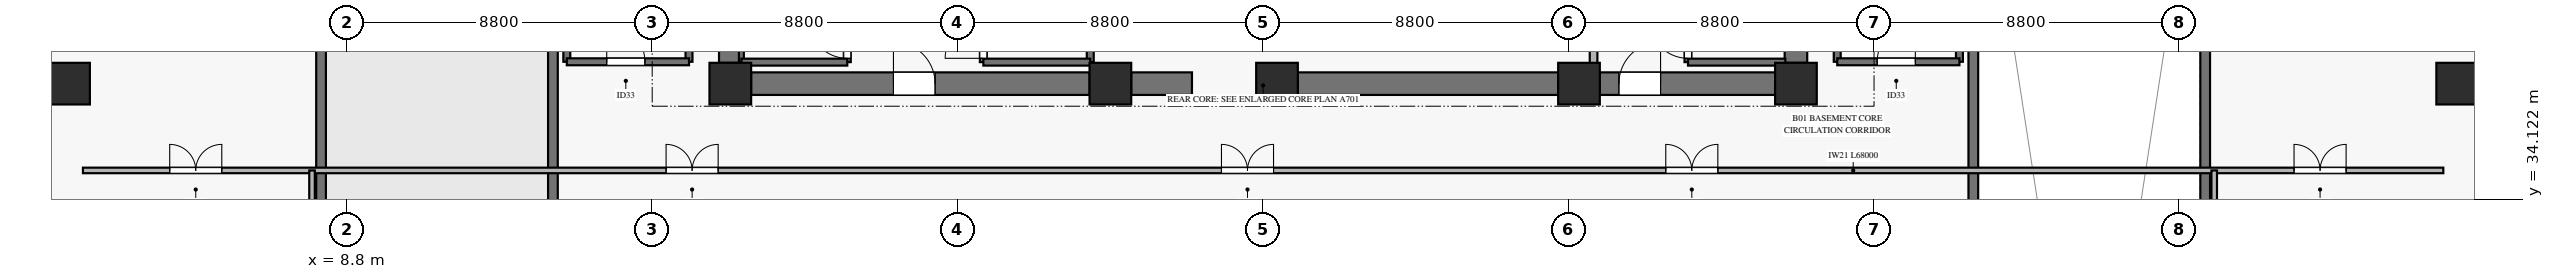
"""IFC4 building model, lengths in metres.
Left out: names, types, materials, properties, quantities, classifications, styles, units other than length and angle.
Written with IfcOpenShell. Run it as: python <this file> out.ifc"""

import sys

from ifc_helpers import new_model, si_unit, direction, frame, frame_2d, origin, origin_2d, place, context, subcontext, project, spatial, rectangle, hollow_rectangle, extrude, source, transform, mapped, element, fill, save


model = new_model("IFC4")
c1 = context("Model", 3, precision=1e-05, world=origin(), true_north=direction((0.0, 1.0)))
c2 = subcontext(c1, "Body", "Model", "MODEL_VIEW")
j1 = project(units=[si_unit("LENGTHUNIT", "METRE"), si_unit("PLANEANGLEUNIT", "RADIAN")], contexts=[c1])
p1 = place(None, origin())
s1 = spatial("IfcSite", under=j1, at=p1, CompositionType="ELEMENT")
p2 = place(p1, origin())
s2 = spatial("IfcBuilding", under=s1, at=p2, CompositionType="ELEMENT")
p3 = place(p2, frame((0.0, 0.0, -5.2)))
s3 = spatial("IfcBuildingStorey", under=s2, at=p3, CompositionType="ELEMENT", Elevation=-5.2)
m1 = source(origin(), c2, "Body", "SweptSolid", [
    extrude(rectangle(XDim=1.2, YDim=1.2, at=origin_2d()), origin(), (0.0, 0.0, 1.0), 4.94),
])
for number, where, z_axis, x_axis in (
    (1, (19.85, 37.45, 0.0), (0.0, 0.0, 1.0), (1.0, 0.0, 0.0)),
    (2, (30.8, 37.45, 0.0), (0.0, 0.0, 1.0), (1.0, 0.0, 0.0)),
    (3, (35.6, 37.45, 0.0), (0.0, 0.0, 1.0), (1.0, 0.0, 0.0)),
    (4, (44.3, 37.45, 0.0), (0.0, 0.0, 1.0), (1.0, 0.0, 0.0)),
    (5, (50.55, 37.45, 0.0), (0.0, 0.0, 1.0), (1.0, 0.0, 0.0)),
):
    element("IfcColumn", number, at=place(p3, frame(where, z_axis=z_axis, x_axis=x_axis)), inside=s3, PredefinedType="PILASTER", context=c2, shape_type="MappedRepresentation", body=[
        mapped(m1, transform((0.0, 0.0, 0.0), x_axis=(1.0, 0.0, 0.0), y_axis=(0.0, 1.0, 0.0), z_axis=(0.0, 0.0, 1.0), scale=1.0)),
    ])
p4 = place(p3, frame((20.45, 37.45, 0.0), z_axis=(0.0, 0.0, 1.0), x_axis=(1.0, 0.0, 0.0)))
e6 = element("IfcWall", 6, at=p4, inside=s3, PredefinedType="SHEAR", context=c2, shape_type="SweptSolid", body=[
    extrude(rectangle(XDim=9.75, YDim=0.65, at=frame_2d((4.875, 0.0))), origin(), (0.0, 0.0, 1.0), 4.94),
])
p5 = place(p4, frame((4.1, 0.0, 0.0)))
e7 = element("IfcOpeningElement", 7, at=p5, cuts=e6, PredefinedType="OPENING", context=c2, shape_type="SweptSolid", body=[
    extrude(rectangle(XDim=1.2, YDim=2.15, at=frame_2d((0.6, 1.075))), frame((0.0, 0.335, 0.0), z_axis=(0.0, -1.0, 0.0), x_axis=(1.0, 0.0, 0.0)), (0.0, 0.0, 1.0), 0.67),
])
p6 = place(p3, frame((31.4, 37.45, 0.0), z_axis=(0.0, 0.0, 1.0), x_axis=(1.0, 0.0, 0.0)))
e8 = element("IfcWall", 8, at=p6, inside=s3, PredefinedType="SHEAR", context=c2, shape_type="SweptSolid", body=[
    extrude(rectangle(XDim=1.75, YDim=0.65, at=frame_2d((0.875, 0.0))), origin(), (0.0, 0.0, 1.0), 4.94),
])
p7 = place(p3, frame((36.2, 37.45, 0.0), z_axis=(0.0, 0.0, 1.0), x_axis=(1.0, 0.0, 0.0)))
e9 = element("IfcWall", 9, at=p7, inside=s3, PredefinedType="SHEAR", context=c2, shape_type="SweptSolid", body=[
    extrude(rectangle(XDim=7.5, YDim=0.65, at=frame_2d((3.75, 0.0))), origin(), (0.0, 0.0, 1.0), 4.94),
])
p8 = place(p3, frame((44.9, 37.45, 0.0), z_axis=(0.0, 0.0, 1.0), x_axis=(1.0, 0.0, 0.0)))
e10 = element("IfcWall", 10, at=p8, inside=s3, PredefinedType="SHEAR", context=c2, shape_type="SweptSolid", body=[
    extrude(rectangle(XDim=5.05, YDim=0.65, at=frame_2d((2.525, 0.0))), origin(), (0.0, 0.0, 1.0), 4.94),
])
p9 = place(p8, frame((0.55, 0.0, 0.0)))
e11 = element("IfcOpeningElement", 11, at=p9, cuts=e10, PredefinedType="OPENING", context=c2, shape_type="SweptSolid", body=[
    extrude(rectangle(XDim=1.2, YDim=2.15, at=frame_2d((0.6, 1.075))), frame((0.0, 0.335, 0.0), z_axis=(0.0, -1.0, 0.0), x_axis=(1.0, 0.0, 0.0)), (0.0, 0.0, 1.0), 0.67),
])
for number, where, z_axis, x_axis in (
    (12, (19.85, 38.05, 0.0), (0.0, 0.0, 1.0), (0.0, 1.0, 0.0)),
    (13, (50.55, 38.05, 0.0), (0.0, 0.0, 1.0), (0.0, 1.0, 0.0)),
):
    element("IfcWall", number, at=place(p3, frame(where, z_axis=z_axis, x_axis=x_axis)), inside=s3, PredefinedType="SHEAR", context=c2, shape_type="SweptSolid", body=[
        extrude(rectangle(XDim=7.9, YDim=0.65, at=frame_2d((3.95, 0.0))), origin(), (0.0, 0.0, 1.0), 4.94),
    ])
m2 = source(origin(), c2, "Body", "SweptSolid", [
    extrude(hollow_rectangle(XDim=1.2, YDim=1.2, WallThickness=0.055, at=origin_2d()), origin(), (0.0, 0.0, 1.0), 4.94),
])
for number, where, z_axis, x_axis in (
    (14, (0.8, 37.45, 0.0), (0.0, 0.0, 1.0), (1.0, 0.0, 0.0)),
    (15, (69.6, 37.45, 0.0), (0.0, 0.0, 1.0), (1.0, 0.0, 0.0)),
):
    element("IfcColumn", number, at=place(p3, frame(where, z_axis=z_axis, x_axis=x_axis)), inside=s3, PredefinedType="COLUMN", context=c2, shape_type="MappedRepresentation", body=[
        mapped(m2, transform((0.0, 0.0, 0.0), x_axis=(1.0, 0.0, 0.0), y_axis=(0.0, 1.0, 0.0), z_axis=(0.0, 0.0, 1.0), scale=1.0)),
    ])
for number, where, z_axis, x_axis in (
    (16, (55.66, 3.46, 0.0), (0.0, 0.0, 1.0), (0.0, 1.0, 0.0)),
    (17, (62.34, 3.46, 0.0), (0.0, 0.0, 1.0), (0.0, 1.0, 0.0)),
):
    element("IfcWall", number, at=place(p3, frame(where, z_axis=z_axis, x_axis=x_axis)), inside=s3, PredefinedType="SOLIDWALL", context=c2, shape_type="SweptSolid", body=[
        extrude(rectangle(XDim=41.74, YDim=0.28, at=frame_2d((20.87, 0.0))), origin(), (0.0, 0.0, 1.0), 4.94),
    ])
for number, where, z_axis, x_axis in (
    (18, (8.06, 6.76, 0.0), (0.0, 0.0, 1.0), (0.0, 1.0, 0.0)),
    (19, (14.74, 6.76, 0.0), (0.0, 0.0, 1.0), (0.0, 1.0, 0.0)),
):
    element("IfcWall", number, at=place(p3, frame(where, z_axis=z_axis, x_axis=x_axis)), inside=s3, PredefinedType="SOLIDWALL", context=c2, shape_type="SweptSolid", body=[
        extrude(rectangle(XDim=42.0, YDim=0.28, at=frame_2d((21.0, 0.0))), origin(), (0.0, 0.0, 1.0), 5.2),
    ])
p10 = place(p3, frame((20.17, 38.07, 0.0), z_axis=(0.0, 0.0, 1.0), x_axis=(0.0, 1.0, 0.0)))
e20 = element("IfcWall", 20, at=p10, inside=s3, PredefinedType="SOLIDWALL", context=c2, shape_type="SweptSolid", body=[
    extrude(rectangle(XDim=7.25, YDim=0.14, at=frame_2d((3.625, 0.0))), origin(), (0.0, 0.0, 1.0), 5.2),
])
p11 = place(p3, frame((23.22, 38.07, 0.0), z_axis=(0.0, 0.0, 1.0), x_axis=(0.0, 1.0, 0.0)))
e21 = element("IfcWall", 21, at=p11, inside=s3, PredefinedType="SOLIDWALL", context=c2, shape_type="SweptSolid", body=[
    extrude(rectangle(XDim=7.25, YDim=0.2, at=frame_2d((3.625, 0.0))), origin(), (0.0, 0.0, 1.0), 5.2),
])
p12 = place(p11, frame((0.11, 0.0, 0.0)))
e22 = element("IfcOpeningElement", 22, at=p12, cuts=e21, PredefinedType="OPENING", context=c2, shape_type="SweptSolid", body=[
    extrude(rectangle(XDim=1.1, YDim=2.15, at=frame_2d((0.55, 1.075))), frame((0.0, 0.11, 0.0), z_axis=(0.0, -1.0, 0.0), x_axis=(1.0, 0.0, 0.0)), (0.0, 0.0, 1.0), 0.22),
])
p13 = place(p3, frame((20.17, 38.07, 0.0), z_axis=(0.0, 0.0, 1.0), x_axis=(1.0, 0.0, 0.0)))
e23 = element("IfcWall", 23, at=p13, inside=s3, PredefinedType="SOLIDWALL", context=c2, shape_type="SweptSolid", body=[
    extrude(rectangle(XDim=3.05, YDim=0.2, at=frame_2d((1.525, 0.0))), origin(), (0.0, 0.0, 1.0), 5.2),
])
p14 = place(p3, frame((27.14, 38.07, 0.0), z_axis=(0.0, 0.0, 1.0), x_axis=(0.0, 1.0, 0.0)))
e24 = element("IfcWall", 24, at=p14, inside=s3, PredefinedType="SOLIDWALL", context=c2, shape_type="SweptSolid", body=[
    extrude(rectangle(XDim=7.25, YDim=0.2, at=frame_2d((3.625, 0.0))), origin(), (0.0, 0.0, 1.0), 5.2),
])
p15 = place(p14, frame((0.11, 0.0, 0.0)))
e25 = element("IfcOpeningElement", 25, at=p15, cuts=e24, PredefinedType="OPENING", context=c2, shape_type="SweptSolid", body=[
    extrude(rectangle(XDim=1.1, YDim=2.15, at=frame_2d((0.55, 1.075))), frame((0.0, 0.11, 0.0), z_axis=(0.0, -1.0, 0.0), x_axis=(1.0, 0.0, 0.0)), (0.0, 0.0, 1.0), 0.22),
])
p16 = place(p3, frame((30.22, 38.07, 0.0), z_axis=(0.0, 0.0, 1.0), x_axis=(0.0, 1.0, 0.0)))
e26 = element("IfcWall", 26, at=p16, inside=s3, PredefinedType="SOLIDWALL", context=c2, shape_type="SweptSolid", body=[
    extrude(rectangle(XDim=7.25, YDim=0.2, at=frame_2d((3.625, 0.0))), origin(), (0.0, 0.0, 1.0), 5.2),
])
p17 = place(p3, frame((27.14, 38.07, 0.0), z_axis=(0.0, 0.0, 1.0), x_axis=(1.0, 0.0, 0.0)))
e27 = element("IfcWall", 27, at=p17, inside=s3, PredefinedType="SOLIDWALL", context=c2, shape_type="SweptSolid", body=[
    extrude(rectangle(XDim=3.08, YDim=0.2, at=frame_2d((1.54, 0.0))), origin(), (0.0, 0.0, 1.0), 5.2),
])
p18 = place(p3, frame((47.44, 38.07, 0.0), z_axis=(0.0, 0.0, 1.0), x_axis=(0.0, 1.0, 0.0)))
e28 = element("IfcWall", 28, at=p18, inside=s3, PredefinedType="SOLIDWALL", context=c2, shape_type="SweptSolid", body=[
    extrude(rectangle(XDim=7.25, YDim=0.2, at=frame_2d((3.625, 0.0))), origin(), (0.0, 0.0, 1.0), 5.2),
])
p19 = place(p18, frame((0.11, 0.0, 0.0)))
e29 = element("IfcOpeningElement", 29, at=p19, cuts=e28, PredefinedType="OPENING", context=c2, shape_type="SweptSolid", body=[
    extrude(rectangle(XDim=1.1, YDim=2.15, at=frame_2d((0.55, 1.075))), frame((0.0, 0.11, 0.0), z_axis=(0.0, -1.0, 0.0), x_axis=(1.0, 0.0, 0.0)), (0.0, 0.0, 1.0), 0.22),
])
p20 = place(p3, frame((47.44, 38.07, 0.0), z_axis=(0.0, 0.0, 1.0), x_axis=(1.0, 0.0, 0.0)))
e30 = element("IfcWall", 30, at=p20, inside=s3, PredefinedType="SOLIDWALL", context=c2, shape_type="SweptSolid", body=[
    extrude(rectangle(XDim=2.805, YDim=0.2, at=frame_2d((1.403, 0.0))), origin(), (0.0, 0.0, 1.0), 5.2),
])
p21 = place(p3, frame((44.72, 37.755, 0.0), z_axis=(0.0, 0.0, 1.0), x_axis=(0.0, 1.0, 0.0)))
e31 = element("IfcWall", 31, at=p21, inside=s3, PredefinedType="SOLIDWALL", context=c2, shape_type="SweptSolid", body=[
    extrude(rectangle(XDim=7.465, YDim=0.22, at=frame_2d((3.732, 0.0))), origin(), (0.0, 0.0, 1.0), 4.94),
])
for number, where, z_axis, x_axis in (
    (32, (15.14, 38.08, 0.0), (0.0, 0.0, 1.0), (0.0, 1.0, 0.0)),
    (33, (18.66, 38.08, 0.0), (0.0, 0.0, 1.0), (0.0, 1.0, 0.0)),
):
    element("IfcWall", number, at=place(p3, frame(where, z_axis=z_axis, x_axis=x_axis)), inside=s3, PredefinedType="SOLIDWALL", context=c2, shape_type="SweptSolid", body=[
        extrude(rectangle(XDim=7.9, YDim=0.2, at=frame_2d((3.95, 0.0))), origin(), (0.0, 0.0, 1.0), 5.2),
    ])
p22 = place(p3, frame((15.14, 38.08, 0.0), z_axis=(0.0, 0.0, 1.0), x_axis=(1.0, 0.0, 0.0)))
e34 = element("IfcWall", 34, at=p22, inside=s3, PredefinedType="SOLIDWALL", context=c2, shape_type="SweptSolid", body=[
    extrude(rectangle(XDim=3.52, YDim=0.2, at=frame_2d((1.76, 0.0))), origin(), (0.0, 0.0, 1.0), 5.2),
])
p23 = place(p22, frame((1.15, 0.0, 0.0)))
e35 = element("IfcOpeningElement", 35, at=p23, cuts=e34, PredefinedType="OPENING", context=c2, shape_type="SweptSolid", body=[
    extrude(rectangle(XDim=1.1, YDim=2.15, at=frame_2d((0.55, 1.075))), frame((0.0, 0.11, 0.0), z_axis=(0.0, -1.0, 0.0), x_axis=(1.0, 0.0, 0.0)), (0.0, 0.0, 1.0), 0.22),
])
for number, where, z_axis, x_axis in (
    (36, (51.74, 38.08, 0.0), (0.0, 0.0, 1.0), (0.0, 1.0, 0.0)),
    (37, (55.26, 38.08, 0.0), (0.0, 0.0, 1.0), (0.0, 1.0, 0.0)),
):
    element("IfcWall", number, at=place(p3, frame(where, z_axis=z_axis, x_axis=x_axis)), inside=s3, PredefinedType="SOLIDWALL", context=c2, shape_type="SweptSolid", body=[
        extrude(rectangle(XDim=7.9, YDim=0.2, at=frame_2d((3.95, 0.0))), origin(), (0.0, 0.0, 1.0), 5.2),
    ])
p24 = place(p3, frame((51.74, 38.08, 0.0), z_axis=(0.0, 0.0, 1.0), x_axis=(1.0, 0.0, 0.0)))
e38 = element("IfcWall", 38, at=p24, inside=s3, PredefinedType="SOLIDWALL", context=c2, shape_type="SweptSolid", body=[
    extrude(rectangle(XDim=3.52, YDim=0.2, at=frame_2d((1.76, 0.0))), origin(), (0.0, 0.0, 1.0), 5.2),
])
p25 = place(p24, frame((1.15, 0.0, 0.0)))
e39 = element("IfcOpeningElement", 39, at=p25, cuts=e38, PredefinedType="OPENING", context=c2, shape_type="SweptSolid", body=[
    extrude(rectangle(XDim=1.1, YDim=2.15, at=frame_2d((0.55, 1.075))), frame((0.0, 0.11, 0.0), z_axis=(0.0, -1.0, 0.0), x_axis=(1.0, 0.0, 0.0)), (0.0, 0.0, 1.0), 0.22),
])
p26 = place(p3, frame((1.2, 34.95, 0.0), z_axis=(0.0, 0.0, 1.0), x_axis=(1.0, 0.0, 0.0)))
e40 = element("IfcWall", 40, at=p26, inside=s3, PredefinedType="PARTITIONING", context=c2, shape_type="SweptSolid", body=[
    extrude(rectangle(XDim=68.0, YDim=0.16, at=frame_2d((34.0, 0.0))), origin(), (0.0, 0.0, 1.0), 3.825),
])
p27 = place(p26, frame((16.8, 0.0, 0.0)))
e41 = element("IfcOpeningElement", 41, at=p27, cuts=e40, PredefinedType="OPENING", context=c2, shape_type="SweptSolid", body=[
    extrude(rectangle(XDim=1.5, YDim=2.2, at=frame_2d((0.75, 1.1))), frame((0.0, 0.09, 0.0), z_axis=(0.0, -1.0, 0.0), x_axis=(1.0, 0.0, 0.0)), (0.0, 0.0, 1.0), 0.18),
])
p28 = place(p26, frame((32.8, 0.0, 0.0)))
e42 = element("IfcOpeningElement", 42, at=p28, cuts=e40, PredefinedType="OPENING", context=c2, shape_type="SweptSolid", body=[
    extrude(rectangle(XDim=1.5, YDim=2.2, at=frame_2d((0.75, 1.1))), frame((0.0, 0.09, 0.0), z_axis=(0.0, -1.0, 0.0), x_axis=(1.0, 0.0, 0.0)), (0.0, 0.0, 1.0), 0.18),
])
p29 = place(p26, frame((45.6, 0.0, 0.0)))
e43 = element("IfcOpeningElement", 43, at=p29, cuts=e40, PredefinedType="OPENING", context=c2, shape_type="SweptSolid", body=[
    extrude(rectangle(XDim=1.5, YDim=2.2, at=frame_2d((0.75, 1.1))), frame((0.0, 0.09, 0.0), z_axis=(0.0, -1.0, 0.0), x_axis=(1.0, 0.0, 0.0)), (0.0, 0.0, 1.0), 0.18),
])
p30 = place(p26, frame((2.5, 0.0, 0.0)))
e44 = element("IfcOpeningElement", 44, at=p30, cuts=e40, PredefinedType="OPENING", context=c2, shape_type="SweptSolid", body=[
    extrude(rectangle(XDim=1.5, YDim=2.2, at=frame_2d((0.75, 1.1))), frame((0.0, 0.09, 0.0), z_axis=(0.0, -1.0, 0.0), x_axis=(1.0, 0.0, 0.0)), (0.0, 0.0, 1.0), 0.18),
])
p31 = place(p26, frame((63.7, 0.0, 0.0)))
e45 = element("IfcOpeningElement", 45, at=p31, cuts=e40, PredefinedType="OPENING", context=c2, shape_type="SweptSolid", body=[
    extrude(rectangle(XDim=1.5, YDim=2.2, at=frame_2d((0.75, 1.1))), frame((0.0, 0.09, 0.0), z_axis=(0.0, -1.0, 0.0), x_axis=(1.0, 0.0, 0.0)), (0.0, 0.0, 1.0), 0.18),
])
for number, where, z_axis, x_axis in (
    (46, (7.8, 1.0, 0.0), (0.0, 0.0, 1.0), (0.0, 1.0, 0.0)),
    (47, (62.6, 1.0, 0.0), (0.0, 0.0, 1.0), (0.0, 1.0, 0.0)),
):
    element("IfcWall", number, at=place(p3, frame(where, z_axis=z_axis, x_axis=x_axis)), inside=s3, PredefinedType="PARTITIONING", context=c2, shape_type="SweptSolid", body=[
        extrude(rectangle(XDim=33.95, YDim=0.16, at=frame_2d((16.975, 0.0))), origin(), (0.0, 0.0, 1.0), 3.825),
    ])
m3 = source(origin(), c2, "Body", "SweptSolid", [
    extrude(rectangle(XDim=1.1, YDim=2.15, at=frame_2d((0.55, 1.075))), frame((0.0, 0.025, 0.0), z_axis=(0.0, -1.0, 0.0), x_axis=(1.0, 0.0, 0.0)), (0.0, 0.0, 1.0), 0.05),
])
p32 = place(p12, origin())
e48 = element("IfcDoor", 48, at=p32, inside=s3, OperationType="SINGLE_SWING_RIGHT", PredefinedType="DOOR", context=c2, shape_type="MappedRepresentation", body=[
    mapped(m3, transform((0.0, 0.0, 0.0), x_axis=(1.0, 0.0, 0.0), y_axis=(0.0, 1.0, 0.0), z_axis=(0.0, 0.0, 1.0), scale=1.0)),
])
fill(e22, e48)
p33 = place(p15, origin())
e49 = element("IfcDoor", 49, at=p33, inside=s3, OperationType="SINGLE_SWING_LEFT", PredefinedType="DOOR", context=c2, shape_type="MappedRepresentation", body=[
    mapped(m3, transform((0.0, 0.0, 0.0), x_axis=(1.0, 0.0, 0.0), y_axis=(0.0, 1.0, 0.0), z_axis=(0.0, 0.0, 1.0), scale=1.0)),
])
fill(e25, e49)
p34 = place(p19, origin())
e50 = element("IfcDoor", 50, at=p34, inside=s3, OperationType="SINGLE_SWING_RIGHT", PredefinedType="DOOR", context=c2, shape_type="MappedRepresentation", body=[
    mapped(m3, transform((0.0, 0.0, 0.0), x_axis=(1.0, 0.0, 0.0), y_axis=(0.0, 1.0, 0.0), z_axis=(0.0, 0.0, 1.0), scale=1.0)),
])
fill(e29, e50)
m4 = source(origin(), c2, "Body", "SweptSolid", [
    extrude(rectangle(XDim=1.2, YDim=2.15, at=frame_2d((0.6, 1.075))), frame((0.0, 0.025, 0.0), z_axis=(0.0, -1.0, 0.0), x_axis=(1.0, 0.0, 0.0)), (0.0, 0.0, 1.0), 0.05),
])
p35 = place(p5, origin())
e51 = element("IfcDoor", 51, at=p35, inside=s3, OperationType="SINGLE_SWING_LEFT", PredefinedType="DOOR", context=c2, shape_type="MappedRepresentation", body=[
    mapped(m4, transform((0.0, 0.0, 0.0), x_axis=(1.0, 0.0, 0.0), y_axis=(0.0, 1.0, 0.0), z_axis=(0.0, 0.0, 1.0), scale=1.0)),
])
fill(e7, e51)
p36 = place(p9, origin())
e52 = element("IfcDoor", 52, at=p36, inside=s3, OperationType="SINGLE_SWING_RIGHT", PredefinedType="DOOR", context=c2, shape_type="MappedRepresentation", body=[
    mapped(m4, transform((0.0, 0.0, 0.0), x_axis=(1.0, 0.0, 0.0), y_axis=(0.0, 1.0, 0.0), z_axis=(0.0, 0.0, 1.0), scale=1.0)),
])
fill(e11, e52)
p37 = place(p23, origin())
e53 = element("IfcDoor", 53, at=p37, inside=s3, OperationType="SINGLE_SWING_LEFT", PredefinedType="DOOR", context=c2, shape_type="MappedRepresentation", body=[
    mapped(m3, transform((0.0, 0.0, 0.0), x_axis=(1.0, 0.0, 0.0), y_axis=(0.0, 1.0, 0.0), z_axis=(0.0, 0.0, 1.0), scale=1.0)),
])
fill(e35, e53)
p38 = place(p25, origin())
e54 = element("IfcDoor", 54, at=p38, inside=s3, OperationType="SINGLE_SWING_RIGHT", PredefinedType="DOOR", context=c2, shape_type="MappedRepresentation", body=[
    mapped(m3, transform((0.0, 0.0, 0.0), x_axis=(1.0, 0.0, 0.0), y_axis=(0.0, 1.0, 0.0), z_axis=(0.0, 0.0, 1.0), scale=1.0)),
])
fill(e39, e54)
m5 = source(origin(), c2, "Body", "SweptSolid", [
    extrude(rectangle(XDim=1.5, YDim=2.2, at=frame_2d((0.75, 1.1))), frame((0.0, 0.025, 0.0), z_axis=(0.0, -1.0, 0.0), x_axis=(1.0, 0.0, 0.0)), (0.0, 0.0, 1.0), 0.05),
])
p39 = place(p27, origin())
e55 = element("IfcDoor", 55, at=p39, inside=s3, OperationType="DOUBLE_SWING_LEFT", PredefinedType="DOOR", context=c2, shape_type="MappedRepresentation", body=[
    mapped(m5, transform((0.0, 0.0, 0.0), x_axis=(1.0, 0.0, 0.0), y_axis=(0.0, 1.0, 0.0), z_axis=(0.0, 0.0, 1.0), scale=1.0)),
])
fill(e41, e55)
p40 = place(p28, origin())
e56 = element("IfcDoor", 56, at=p40, inside=s3, OperationType="DOUBLE_SWING_LEFT", PredefinedType="DOOR", context=c2, shape_type="MappedRepresentation", body=[
    mapped(m5, transform((0.0, 0.0, 0.0), x_axis=(1.0, 0.0, 0.0), y_axis=(0.0, 1.0, 0.0), z_axis=(0.0, 0.0, 1.0), scale=1.0)),
])
fill(e42, e56)
p41 = place(p29, origin())
e57 = element("IfcDoor", 57, at=p41, inside=s3, OperationType="DOUBLE_SWING_LEFT", PredefinedType="DOOR", context=c2, shape_type="MappedRepresentation", body=[
    mapped(m5, transform((0.0, 0.0, 0.0), x_axis=(1.0, 0.0, 0.0), y_axis=(0.0, 1.0, 0.0), z_axis=(0.0, 0.0, 1.0), scale=1.0)),
])
fill(e43, e57)
p42 = place(p30, origin())
e58 = element("IfcDoor", 58, at=p42, inside=s3, OperationType="DOUBLE_SWING_LEFT", PredefinedType="DOOR", context=c2, shape_type="MappedRepresentation", body=[
    mapped(m5, transform((0.0, 0.0, 0.0), x_axis=(1.0, 0.0, 0.0), y_axis=(0.0, 1.0, 0.0), z_axis=(0.0, 0.0, 1.0), scale=1.0)),
])
fill(e44, e58)
p43 = place(p31, origin())
e59 = element("IfcDoor", 59, at=p43, inside=s3, OperationType="DOUBLE_SWING_LEFT", PredefinedType="DOOR", context=c2, shape_type="MappedRepresentation", body=[
    mapped(m5, transform((0.0, 0.0, 0.0), x_axis=(1.0, 0.0, 0.0), y_axis=(0.0, 1.0, 0.0), z_axis=(0.0, 0.0, 1.0), scale=1.0)),
])
fill(e45, e59)
save(model, sys.argv[1])
